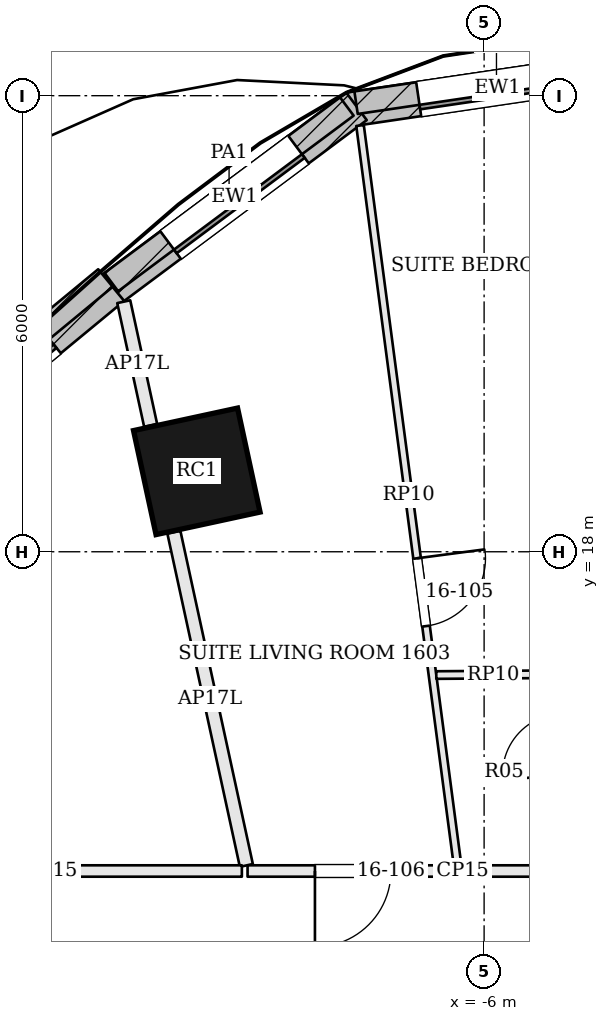
"""IFC4 building model, lengths in metres.
Left out: names, types, materials, properties, quantities, classifications, styles, units other than length and angle.
Written with IfcOpenShell. Run it as: python <this file> out.ifc"""

import sys

from ifc_helpers import new_model, si_unit, direction, frame, frame_2d, origin, origin_2d, place, context, subcontext, project, spatial, rectangle, extrude, element, fill, save


model = new_model("IFC4")
c1 = context("Model", 3, precision=1e-05, world=origin(), true_north=direction((0.0, 1.0)))
c2 = subcontext(c1, "Body", "Model", "MODEL_VIEW")
j1 = project(units=[si_unit("LENGTHUNIT", "METRE"), si_unit("PLANEANGLEUNIT", "RADIAN")], contexts=[c1])
p1 = place(None, origin())
s1 = spatial("IfcSite", under=j1, at=p1, CompositionType="ELEMENT")
p2 = place(p1, origin())
s2 = spatial("IfcBuilding", under=s1, at=p2, CompositionType="ELEMENT")
p3 = place(p2, frame((0.0, 0.0, 73.5)))
s3 = spatial("IfcBuildingStorey", under=s2, at=p3, CompositionType="ELEMENT", Elevation=73.5)
p4 = place(p3, frame((-9.78, 19.058, 0.0), z_axis=(0.0, 0.0, 1.0), x_axis=(-0.977386186482, -0.211462153764, 0.0)))
e1 = element("IfcColumn", 1, at=p4, inside=s3, PredefinedType="COLUMN", context=c2, shape_type="SweptSolid", body=[
    extrude(rectangle(XDim=1.4, YDim=1.4, at=origin_2d()), origin(), (0.0, 0.0, 1.0), 2.8),
])
p5 = place(p3, frame((-3.866, 24.396, 0.0), z_axis=(0.0, 0.0, 1.0), x_axis=(-0.989255112942, -0.146199594798, 0.0)))
e2 = element("IfcWall", 2, at=p5, inside=s3, PredefinedType="SOLIDWALL", context=c2, shape_type="SweptSolid", body=[
    extrude(rectangle(XDim=3.954, YDim=0.45, at=frame_2d((1.977, 0.0))), origin(), (0.0, 0.0, 1.0), 3.3),
])
p6 = place(p5, frame((0.927, 0.0, 0.9)))
e3 = element("IfcOpeningElement", 3, at=p6, cuts=e2, PredefinedType="OPENING", context=c2, shape_type="SweptSolid", body=[
    extrude(rectangle(XDim=2.1, YDim=1.8, at=frame_2d((1.05, 0.9))), frame((0.0, 0.235, 0.0), z_axis=(0.0, -1.0, 0.0), x_axis=(1.0, 0.0, 0.0)), (0.0, 0.0, 1.0), 0.47),
])
p7 = place(p3, frame((-7.678, 23.859, 0.0), z_axis=(0.0, 0.0, 1.0), x_axis=(-0.801665619573, -0.597772728046, 0.0)))
e4 = element("IfcWall", 4, at=p7, inside=s3, PredefinedType="SOLIDWALL", context=c2, shape_type="SweptSolid", body=[
    extrude(rectangle(XDim=4.003, YDim=0.45, at=frame_2d((2.001, 0.0))), origin(), (0.0, 0.0, 1.0), 3.3),
])
p8 = place(p7, frame((0.951, 0.0, 0.9)))
e5 = element("IfcOpeningElement", 5, at=p8, cuts=e4, PredefinedType="OPENING", context=c2, shape_type="SweptSolid", body=[
    extrude(rectangle(XDim=2.1, YDim=1.8, at=frame_2d((1.05, 0.9))), frame((0.0, 0.235, 0.0), z_axis=(0.0, -1.0, 0.0), x_axis=(1.0, 0.0, 0.0)), (0.0, 0.0, 1.0), 0.47),
])
p9 = place(p3, frame((-10.879, 21.473, 0.0), z_axis=(0.0, 0.0, 1.0), x_axis=(-0.77124668946, -0.636536365023, 0.0)))
e6 = element("IfcWall", 6, at=p9, inside=s3, PredefinedType="SOLIDWALL", context=c2, shape_type="SweptSolid", body=[
    extrude(rectangle(XDim=4.261, YDim=0.45, at=frame_2d((2.13, 0.0))), origin(), (0.0, 0.0, 1.0), 3.3),
])
p10 = place(p9, frame((1.08, 0.0, 0.9)))
e7 = element("IfcOpeningElement", 7, at=p10, cuts=e6, PredefinedType="OPENING", context=c2, shape_type="SweptSolid", body=[
    extrude(rectangle(XDim=2.1, YDim=1.8, at=frame_2d((1.05, 0.9))), frame((0.0, 0.235, 0.0), z_axis=(0.0, -1.0, 0.0), x_axis=(1.0, 0.0, 0.0)), (0.0, 0.0, 1.0), 0.47),
])
p11 = place(p3, frame((-3.99, 24.454, 3.6), z_axis=(0.0, 0.0, 1.0), x_axis=(-0.989258150551, -0.146179039429, 0.0)))
e8 = element("IfcWall", 8, at=p11, inside=s3, PredefinedType="PARAPET", context=c2, shape_type="SweptSolid", body=[
    extrude(rectangle(XDim=3.734, YDim=0.3, at=frame_2d((1.867, 0.0))), origin(), (0.0, 0.0, 1.0), 1.1),
])
p12 = place(p3, frame((-7.806, 23.858, 3.6), z_axis=(0.0, 0.0, 1.0), x_axis=(-0.801649538596, -0.597794293439, 0.0)))
e9 = element("IfcWall", 9, at=p12, inside=s3, PredefinedType="PARAPET", context=c2, shape_type="SweptSolid", body=[
    extrude(rectangle(XDim=3.865, YDim=0.3, at=frame_2d((1.932, 0.0))), origin(), (0.0, 0.0, 1.0), 1.1),
])
p13 = place(p3, frame((-10.982, 21.601, 3.6), z_axis=(0.0, 0.0, 1.0), x_axis=(-0.771288080572, -0.63648621098, 0.0)))
e10 = element("IfcWall", 10, at=p13, inside=s3, PredefinedType="PARAPET", context=c2, shape_type="SweptSolid", body=[
    extrude(rectangle(XDim=2.603, YDim=0.3, at=frame_2d((1.301, 0.0))), origin(), (0.0, 0.0, 1.0), 1.1),
])
p14 = place(p3, frame((-3.451, 13.8, 0.0), z_axis=(0.0, 0.0, 1.0), x_axis=(-1.0, 0.0, 0.0)))
e11 = element("IfcWall", 11, at=p14, inside=s3, PredefinedType="PARTITIONING", context=c2, shape_type="SweptSolid", body=[
    extrude(rectangle(XDim=5.661, YDim=0.15, at=frame_2d((2.831, 0.0))), origin(), (0.0, 0.0, 1.0), 2.684),
])
p15 = place(p14, frame((3.775, 0.0, 0.0)))
e12 = element("IfcOpeningElement", 12, at=p15, cuts=e11, PredefinedType="OPENING", context=c2, shape_type="SweptSolid", body=[
    extrude(rectangle(XDim=1.0, YDim=2.1, at=frame_2d((0.5, 1.05))), frame((0.0, 0.085, 0.0), z_axis=(0.0, -1.0, 0.0), x_axis=(1.0, 0.0, 0.0)), (0.0, 0.0, 1.0), 0.17),
])
p16 = place(p3, frame((-10.741, 21.29, 0.0), z_axis=(0.0, 0.0, 1.0), x_axis=(0.212673207196, -0.977123383683, 0.0)))
e13 = element("IfcWall", 13, at=p16, inside=s3, PredefinedType="PARTITIONING", context=c2, shape_type="SweptSolid", body=[
    extrude(rectangle(XDim=1.665, YDim=0.175, at=frame_2d((0.832, 0.0))), origin(), (0.0, 0.0, 1.0), 2.28),
])
p17 = place(p3, frame((-10.081, 18.256, 0.0), z_axis=(0.0, 0.0, 1.0), x_axis=(0.212553930516, -0.977149336909, 0.0)))
e14 = element("IfcWall", 14, at=p17, inside=s3, PredefinedType="PARTITIONING", context=c2, shape_type="SweptSolid", body=[
    extrude(rectangle(XDim=4.485, YDim=0.175, at=frame_2d((2.243, 0.0))), origin(), (0.0, 0.0, 1.0), 2.28),
])
p18 = place(p3, frame((-9.187, 13.8, 0.0), z_axis=(0.0, 0.0, 1.0), x_axis=(-1.0, 0.0, 0.0)))
e15 = element("IfcWall", 15, at=p18, inside=s3, PredefinedType="PARTITIONING", context=c2, shape_type="SweptSolid", body=[
    extrude(rectangle(XDim=5.613, YDim=0.15, at=frame_2d((2.807, 0.0))), origin(), (0.0, 0.0, 1.0), 2.684),
])
p19 = place(p18, frame((3.3, 0.0, 0.0)))
e16 = element("IfcOpeningElement", 16, at=p19, cuts=e15, PredefinedType="OPENING", context=c2, shape_type="SweptSolid", body=[
    extrude(rectangle(XDim=1.8, YDim=2.1, at=frame_2d((0.9, 1.05))), frame((0.0, 0.085, 0.0), z_axis=(0.0, -1.0, 0.0), x_axis=(1.0, 0.0, 0.0)), (0.0, 0.0, 1.0), 0.17),
])
p20 = place(p3, frame((-7.633, 23.608, 0.0), z_axis=(0.0, 0.0, 1.0), x_axis=(0.130728541202, -0.991418200617, 0.0)))
e17 = element("IfcWall", 17, at=p20, inside=s3, PredefinedType="PARTITIONING", context=c2, shape_type="SweptSolid", body=[
    extrude(rectangle(XDim=9.818, YDim=0.1, at=frame_2d((4.909, 0.0))), origin(), (0.0, 0.0, 1.0), 2.784),
])
p21 = place(p20, frame((5.743, 0.0, 0.0)))
e18 = element("IfcOpeningElement", 18, at=p21, cuts=e17, PredefinedType="OPENING", context=c2, shape_type="SweptSolid", body=[
    extrude(rectangle(XDim=0.9, YDim=2.4, at=frame_2d((0.45, 1.2))), frame((0.0, 0.06, 0.0), z_axis=(0.0, -1.0, 0.0), x_axis=(1.0, 0.0, 0.0)), (0.0, 0.0, 1.0), 0.12),
])
p22 = place(p3, frame((-5.131, 16.388, 0.0), z_axis=(0.0, 0.0, 1.0), x_axis=(-0.99997543811, -0.007008792802, 0.0)))
e19 = element("IfcWall", 19, at=p22, inside=s3, PredefinedType="PARTITIONING", context=c2, shape_type="SweptSolid", body=[
    extrude(rectangle(XDim=1.498, YDim=0.1, at=frame_2d((0.749, 0.0))), origin(), (0.0, 0.0, 1.0), 2.784),
])
p23 = place(p6, origin())
e20 = element("IfcWindow", 20, at=p23, inside=s3, PartitioningType="SINGLE_PANEL", PredefinedType="WINDOW", context=c2, shape_type="SweptSolid", body=[
    extrude(rectangle(XDim=2.1, YDim=1.8, at=frame_2d((1.05, 0.9))), frame((0.0, 0.135, 0.0), z_axis=(0.0, -1.0, 0.0), x_axis=(1.0, 0.0, 0.0)), (0.0, 0.0, 1.0), 0.06),
])
fill(e3, e20)
p24 = place(p8, origin())
e21 = element("IfcWindow", 21, at=p24, inside=s3, PartitioningType="SINGLE_PANEL", PredefinedType="WINDOW", context=c2, shape_type="SweptSolid", body=[
    extrude(rectangle(XDim=2.1, YDim=1.8, at=frame_2d((1.05, 0.9))), frame((0.0, 0.135, 0.0), z_axis=(0.0, -1.0, 0.0), x_axis=(1.0, 0.0, 0.0)), (0.0, 0.0, 1.0), 0.06),
])
fill(e5, e21)
p25 = place(p10, origin())
e22 = element("IfcWindow", 22, at=p25, inside=s3, PartitioningType="SINGLE_PANEL", PredefinedType="WINDOW", context=c2, shape_type="SweptSolid", body=[
    extrude(rectangle(XDim=2.1, YDim=1.8, at=frame_2d((1.05, 0.9))), frame((0.0, 0.135, 0.0), z_axis=(0.0, -1.0, 0.0), x_axis=(1.0, 0.0, 0.0)), (0.0, 0.0, 1.0), 0.06),
])
fill(e7, e22)
p26 = place(p21, origin())
e23 = element("IfcDoor", 23, at=p26, inside=s3, OperationType="SINGLE_SWING_LEFT", PredefinedType="DOOR", context=c2, shape_type="SweptSolid", body=[
    extrude(rectangle(XDim=0.9, YDim=2.4, at=frame_2d((0.45, 1.2))), frame((0.0, 0.025, 0.0), z_axis=(0.0, -1.0, 0.0), x_axis=(1.0, 0.0, 0.0)), (0.0, 0.0, 1.0), 0.05),
])
fill(e18, e23)
p27 = place(p15, origin())
e24 = element("IfcDoor", 24, at=p27, inside=s3, OperationType="SINGLE_SWING_RIGHT", PredefinedType="DOOR", context=c2, shape_type="SweptSolid", body=[
    extrude(rectangle(XDim=1.0, YDim=2.1, at=frame_2d((0.5, 1.05))), frame((0.0, 0.025, 0.0), z_axis=(0.0, -1.0, 0.0), x_axis=(1.0, 0.0, 0.0)), (0.0, 0.0, 1.0), 0.05),
])
fill(e12, e24)
save(model, sys.argv[1])
